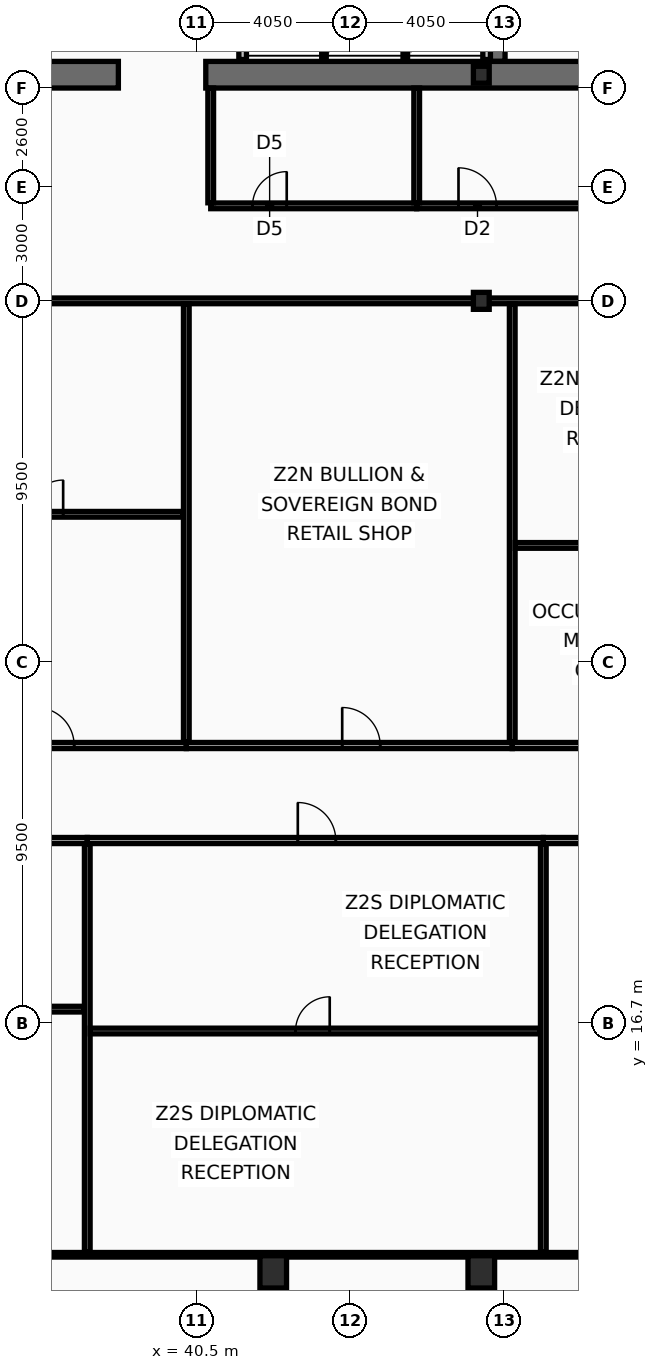
"""IFC4 building model, lengths in metres.
Left out: names, types, materials, properties, quantities, classifications, styles, units other than length and angle.
Written with IfcOpenShell. Run it as: python <this file> out.ifc"""

import sys

from ifc_helpers import new_model, si_unit, direction, frame, frame_2d, origin, origin_2d, place, context, subcontext, project, spatial, rectangle, hollow_rectangle, i_section, extrude, element, fill, save


model = new_model("IFC4")
c1 = context("Model", 3, precision=1e-05, world=origin(), true_north=direction((0.0, 1.0)))
c2 = subcontext(c1, "Body", "Model", "MODEL_VIEW")
j1 = project(units=[si_unit("LENGTHUNIT", "METRE"), si_unit("PLANEANGLEUNIT", "RADIAN")], contexts=[c1])
p1 = place(None, origin())
s1 = spatial("IfcSite", under=j1, at=p1, CompositionType="ELEMENT")
p2 = place(p1, origin())
s2 = spatial("IfcBuilding", under=s1, at=p2, CompositionType="ELEMENT")
p3 = place(p2, frame((0.0, 0.0, 165.0)))
s3 = spatial("IfcBuildingStorey", under=s2, at=p3, CompositionType="ELEMENT", Elevation=165.0)
p4 = place(p3, frame((48.4, 42.0, 0.0), z_axis=(0.0, 0.0, 1.0), x_axis=(0.0, 1.0, 0.0)))
e1 = element("IfcWall", 1, at=p4, inside=s3, PredefinedType="SHEAR", context=c2, shape_type="SweptSolid", body=[
    extrude(rectangle(XDim=11.0, YDim=0.45, at=frame_2d((5.5, 0.0))), origin(), (0.0, 0.0, 1.0), 3.44),
])
p5 = place(p3, frame((38.45, 41.65, 0.0), z_axis=(0.0, 0.0, 1.0), x_axis=(-1.0, 0.0, 0.0)))
e2 = element("IfcWall", 2, at=p5, inside=s3, PredefinedType="SHEAR", context=c2, shape_type="SweptSolid", body=[
    extrude(rectangle(XDim=3.75, YDim=0.7, at=frame_2d((1.875, 0.0))), origin(), (0.0, 0.0, 1.0), 3.44),
])
p6 = place(p3, frame((52.05, 41.65, 0.0), z_axis=(0.0, 0.0, 1.0), x_axis=(-1.0, 0.0, 0.0)))
e3 = element("IfcWall", 3, at=p6, inside=s3, PredefinedType="SHEAR", context=c2, shape_type="SweptSolid", body=[
    extrude(rectangle(XDim=11.3, YDim=0.7, at=frame_2d((5.65, 0.0))), origin(), (0.0, 0.0, 1.0), 3.44),
])
for number, where, z_axis, x_axis in (
    (4, (42.525, 10.15, 0.0), (0.0, 0.0, 1.0), (1.0, 0.0, 0.0)),
    (5, (48.0, 10.15, 0.0), (0.0, 0.0, 1.0), (1.0, 0.0, 0.0)),
):
    element("IfcColumn", number, at=place(p3, frame(where, z_axis=z_axis, x_axis=x_axis)), inside=s3, PredefinedType="COLUMN", context=c2, shape_type="SweptSolid", body=[
        extrude(hollow_rectangle(XDim=0.7, YDim=0.85, WallThickness=0.05, at=origin_2d()), origin(), (0.0, 0.0, 1.0), 3.6),
    ])
for number, where, z_axis, x_axis in (
    (6, (48.0, 35.7, 0.0), (0.0, 0.0, 1.0), (1.0, 0.0, 0.0)),
    (7, (48.0, 41.65, 0.0), (0.0, 0.0, 1.0), (1.0, 0.0, 0.0)),
):
    element("IfcColumn", number, at=place(p3, frame(where, z_axis=z_axis, x_axis=x_axis)), inside=s3, PredefinedType="COLUMN", context=c2, shape_type="SweptSolid", body=[
        extrude(i_section(OverallWidth=0.416, OverallDepth=0.446, WebThickness=0.039, FlangeThickness=0.063, at=origin_2d()), origin(), (0.0, 0.0, 1.0), 3.6),
    ])
for number, where, z_axis, x_axis in (
    (8, (41.72, 42.05, 0.0), (0.0, 0.0, 1.0), (0.0, 1.0, 0.0)),
    (9, (48.14, 42.05, 0.0), (0.0, 0.0, 1.0), (0.0, 1.0, 0.0)),
):
    element("IfcWall", number, at=place(p3, frame(where, z_axis=z_axis, x_axis=x_axis)), inside=s3, PredefinedType="PARTITIONING", context=c2, shape_type="SweptSolid", body=[
        extrude(rectangle(XDim=2.195, YDim=0.2, at=frame_2d((1.098, 0.0))), origin(), (0.0, 0.0, 1.0), 3.44),
    ])
for number, where, z_axis, x_axis in (
    (10, (43.86, 42.05, 0.0), (0.0, 0.0, 1.0), (0.0, 1.0, 0.0)),
    (11, (46.0, 42.05, 0.0), (0.0, 0.0, 1.0), (0.0, 1.0, 0.0)),
):
    element("IfcWall", number, at=place(p3, frame(where, z_axis=z_axis, x_axis=x_axis)), inside=s3, PredefinedType="PARTITIONING", context=c2, shape_type="SweptSolid", body=[
        extrude(rectangle(XDim=2.195, YDim=0.12, at=frame_2d((1.098, 0.0))), origin(), (0.0, 0.0, 1.0), 3.44),
    ])
p7 = place(p3, frame((40.88, 38.2, 0.0), z_axis=(0.0, 0.0, 1.0), x_axis=(1.0, 0.0, 0.0)))
e12 = element("IfcWall", 12, at=p7, inside=s3, PredefinedType="PARTITIONING", context=c2, shape_type="SweptSolid", body=[
    extrude(rectangle(XDim=5.42, YDim=0.15, at=frame_2d((2.71, 0.0))), origin(), (0.0, 0.0, 1.0), 2.73),
])
p8 = place(p7, frame((1.1, 0.0, 0.0)))
e13 = element("IfcOpeningElement", 13, at=p8, cuts=e12, PredefinedType="OPENING", context=c2, shape_type="SweptSolid", body=[
    extrude(rectangle(XDim=0.9, YDim=2.05, at=frame_2d((0.45, 1.025))), frame((0.0, 0.085, 0.0), z_axis=(0.0, -1.0, 0.0), x_axis=(1.0, 0.0, 0.0)), (0.0, 0.0, 1.0), 0.17),
])
p9 = place(p3, frame((46.3, 38.2, 0.0), z_axis=(0.0, 0.0, 1.0), x_axis=(1.0, 0.0, 0.0)))
e14 = element("IfcWall", 14, at=p9, inside=s3, PredefinedType="PARTITIONING", context=c2, shape_type="SweptSolid", body=[
    extrude(rectangle(XDim=5.65, YDim=0.15, at=frame_2d((2.825, 0.0))), origin(), (0.0, 0.0, 1.0), 2.73),
])
p10 = place(p9, frame((1.1, 0.0, 0.0)))
e15 = element("IfcOpeningElement", 15, at=p10, cuts=e14, PredefinedType="OPENING", context=c2, shape_type="SweptSolid", body=[
    extrude(rectangle(XDim=1.0, YDim=2.05, at=frame_2d((0.5, 1.025))), frame((0.0, 0.085, 0.0), z_axis=(0.0, -1.0, 0.0), x_axis=(1.0, 0.0, 0.0)), (0.0, 0.0, 1.0), 0.17),
])
for number, where, z_axis, x_axis in (
    (16, (40.88, 38.28, 0.0), (0.0, 0.0, 1.0), (0.0, 1.0, 0.0)),
    (17, (46.3, 38.28, 0.0), (0.0, 0.0, 1.0), (0.0, 1.0, 0.0)),
):
    element("IfcWall", number, at=place(p3, frame(where, z_axis=z_axis, x_axis=x_axis)), inside=s3, PredefinedType="PARTITIONING", context=c2, shape_type="SweptSolid", body=[
        extrude(rectangle(XDim=3.02, YDim=0.15, at=frame_2d((1.51, 0.0))), origin(), (0.0, 0.0, 1.0), 3.44),
    ])
p11 = place(p3, frame((24.093, 21.5, 0.0), z_axis=(0.0, 0.0, 1.0), x_axis=(1.0, 0.0, 0.0)))
e18 = element("IfcWall", 18, at=p11, inside=s3, PredefinedType="PARTITIONING", context=c2, shape_type="SweptSolid", body=[
    extrude(rectangle(XDim=13.538, YDim=0.16, at=frame_2d((6.769, 0.0))), origin(), (0.0, 0.0, 1.0), 2.73),
])
p12 = place(p11, frame((6.186, 0.0, 0.0)))
e19 = element("IfcOpeningElement", 19, at=p12, cuts=e18, PredefinedType="OPENING", context=c2, shape_type="SweptSolid", body=[
    extrude(rectangle(XDim=1.0, YDim=2.05, at=frame_2d((0.5, 1.025))), frame((0.0, 0.09, 0.0), z_axis=(0.0, -1.0, 0.0), x_axis=(1.0, 0.0, 0.0)), (0.0, 0.0, 1.0), 0.18),
])
p13 = place(p3, frame((24.173, 17.063, 0.0), z_axis=(0.0, 0.0, 1.0), x_axis=(1.0, 0.0, 0.0)))
e20 = element("IfcWall", 20, at=p13, inside=s3, PredefinedType="PARTITIONING", context=c2, shape_type="SweptSolid", body=[
    extrude(rectangle(XDim=13.378, YDim=0.15, at=frame_2d((6.689, 0.0))), origin(), (0.0, 0.0, 1.0), 2.73),
])
p14 = place(p13, frame((6.092, 0.0, 0.0)))
e21 = element("IfcOpeningElement", 21, at=p14, cuts=e20, PredefinedType="OPENING", context=c2, shape_type="SweptSolid", body=[
    extrude(rectangle(XDim=0.9, YDim=2.05, at=frame_2d((0.45, 1.025))), frame((0.0, 0.085, 0.0), z_axis=(0.0, -1.0, 0.0), x_axis=(1.0, 0.0, 0.0)), (0.0, 0.0, 1.0), 0.17),
])
p15 = place(p3, frame((37.631, 21.5, 0.0), z_axis=(0.0, 0.0, 1.0), x_axis=(1.0, 0.0, 0.0)))
e22 = element("IfcWall", 22, at=p15, inside=s3, PredefinedType="PARTITIONING", context=c2, shape_type="SweptSolid", body=[
    extrude(rectangle(XDim=12.0, YDim=0.16, at=frame_2d((6.0, 0.0))), origin(), (0.0, 0.0, 1.0), 2.73),
])
p16 = place(p15, frame((5.54, 0.0, 0.0)))
e23 = element("IfcOpeningElement", 23, at=p16, cuts=e22, PredefinedType="OPENING", context=c2, shape_type="SweptSolid", body=[
    extrude(rectangle(XDim=1.0, YDim=2.05, at=frame_2d((0.5, 1.025))), frame((0.0, 0.09, 0.0), z_axis=(0.0, -1.0, 0.0), x_axis=(1.0, 0.0, 0.0)), (0.0, 0.0, 1.0), 0.18),
])
p17 = place(p3, frame((37.631, 10.665, 0.0), z_axis=(0.0, 0.0, 1.0), x_axis=(0.0, 1.0, 0.0)))
e24 = element("IfcWall", 24, at=p17, inside=s3, PredefinedType="PARTITIONING", context=c2, shape_type="SweptSolid", body=[
    extrude(rectangle(XDim=10.75, YDim=0.15, at=frame_2d((5.375, 0.0))), origin(), (0.0, 0.0, 1.0), 2.93),
])
p18 = place(p3, frame((37.711, 16.488, 0.0), z_axis=(0.0, 0.0, 1.0), x_axis=(1.0, 0.0, 0.0)))
e25 = element("IfcWall", 25, at=p18, inside=s3, PredefinedType="PARTITIONING", context=c2, shape_type="SweptSolid", body=[
    extrude(rectangle(XDim=11.841, YDim=0.15, at=frame_2d((5.92, 0.0))), origin(), (0.0, 0.0, 1.0), 2.73),
])
p19 = place(p18, frame((5.4, 0.0, 0.0)))
e26 = element("IfcOpeningElement", 26, at=p19, cuts=e25, PredefinedType="OPENING", context=c2, shape_type="SweptSolid", body=[
    extrude(rectangle(XDim=0.9, YDim=2.05, at=frame_2d((0.45, 1.025))), frame((0.0, 0.085, 0.0), z_axis=(0.0, -1.0, 0.0), x_axis=(1.0, 0.0, 0.0)), (0.0, 0.0, 1.0), 0.17),
])
p20 = place(p3, frame((49.632, 21.5, 0.0), z_axis=(0.0, 0.0, 1.0), x_axis=(1.0, 0.0, 0.0)))
e27 = element("IfcWall", 27, at=p20, inside=s3, PredefinedType="PARTITIONING", context=c2, shape_type="SweptSolid", body=[
    extrude(rectangle(XDim=8.1, YDim=0.16, at=frame_2d((4.05, 0.0))), origin(), (0.0, 0.0, 1.0), 2.73),
])
p21 = place(p20, frame((3.902, 0.0, 0.0)))
e28 = element("IfcOpeningElement", 28, at=p21, cuts=e27, PredefinedType="OPENING", context=c2, shape_type="SweptSolid", body=[
    extrude(rectangle(XDim=1.0, YDim=2.05, at=frame_2d((0.5, 1.025))), frame((0.0, 0.09, 0.0), z_axis=(0.0, -1.0, 0.0), x_axis=(1.0, 0.0, 0.0)), (0.0, 0.0, 1.0), 0.18),
])
p22 = place(p3, frame((49.632, 10.665, 0.0), z_axis=(0.0, 0.0, 1.0), x_axis=(0.0, 1.0, 0.0)))
e29 = element("IfcWall", 29, at=p22, inside=s3, PredefinedType="PARTITIONING", context=c2, shape_type="SweptSolid", body=[
    extrude(rectangle(XDim=10.75, YDim=0.15, at=frame_2d((5.375, 0.0))), origin(), (0.0, 0.0, 1.0), 2.93),
])
p23 = place(p3, frame((21.81, 35.7, 0.0), z_axis=(0.0, 0.0, 1.0), x_axis=(1.0, 0.0, 0.0)))
e30 = element("IfcWall", 30, at=p23, inside=s3, PredefinedType="PARTITIONING", context=c2, shape_type="SweptSolid", body=[
    extrude(rectangle(XDim=44.995, YDim=0.15, at=frame_2d((22.498, 0.0))), origin(), (0.0, 0.0, 1.0), 2.73),
])
p24 = place(p3, frame((32.564, 24.0, 0.0), z_axis=(0.0, 0.0, 1.0), x_axis=(1.0, 0.0, 0.0)))
e31 = element("IfcWall", 31, at=p24, inside=s3, PredefinedType="PARTITIONING", context=c2, shape_type="SweptSolid", body=[
    extrude(rectangle(XDim=7.674, YDim=0.16, at=frame_2d((3.837, 0.0))), origin(), (0.0, 0.0, 1.0), 3.44),
])
p25 = place(p24, frame((3.723, 0.0, 0.0)))
e32 = element("IfcOpeningElement", 32, at=p25, cuts=e31, PredefinedType="OPENING", context=c2, shape_type="SweptSolid", body=[
    extrude(rectangle(XDim=1.0, YDim=2.05, at=frame_2d((0.5, 1.025))), frame((0.0, 0.09, 0.0), z_axis=(0.0, -1.0, 0.0), x_axis=(1.0, 0.0, 0.0)), (0.0, 0.0, 1.0), 0.18),
])
p26 = place(p3, frame((32.644, 30.084, 0.0), z_axis=(0.0, 0.0, 1.0), x_axis=(1.0, 0.0, 0.0)))
e33 = element("IfcWall", 33, at=p26, inside=s3, PredefinedType="PARTITIONING", context=c2, shape_type="SweptSolid", body=[
    extrude(rectangle(XDim=7.514, YDim=0.15, at=frame_2d((3.757, 0.0))), origin(), (0.0, 0.0, 1.0), 2.93),
])
p27 = place(p26, frame((3.453, 0.0, 0.0)))
e34 = element("IfcOpeningElement", 34, at=p27, cuts=e33, PredefinedType="OPENING", context=c2, shape_type="SweptSolid", body=[
    extrude(rectangle(XDim=0.9, YDim=2.05, at=frame_2d((0.45, 1.025))), frame((0.0, 0.085, 0.0), z_axis=(0.0, -1.0, 0.0), x_axis=(1.0, 0.0, 0.0)), (0.0, 0.0, 1.0), 0.17),
])
p28 = place(p3, frame((40.237, 24.0, 0.0), z_axis=(0.0, 0.0, 1.0), x_axis=(1.0, 0.0, 0.0)))
e35 = element("IfcWall", 35, at=p28, inside=s3, PredefinedType="PARTITIONING", context=c2, shape_type="SweptSolid", body=[
    extrude(rectangle(XDim=8.577, YDim=0.16, at=frame_2d((4.288, 0.0))), origin(), (0.0, 0.0, 1.0), 2.73),
])
p29 = place(p28, frame((4.102, 0.0, 0.0)))
e36 = element("IfcOpeningElement", 36, at=p29, cuts=e35, PredefinedType="OPENING", context=c2, shape_type="SweptSolid", body=[
    extrude(rectangle(XDim=1.0, YDim=2.05, at=frame_2d((0.5, 1.025))), frame((0.0, 0.09, 0.0), z_axis=(0.0, -1.0, 0.0), x_axis=(1.0, 0.0, 0.0)), (0.0, 0.0, 1.0), 0.18),
])
p30 = place(p3, frame((40.237, 24.085, 0.0), z_axis=(0.0, 0.0, 1.0), x_axis=(0.0, 1.0, 0.0)))
e37 = element("IfcWall", 37, at=p30, inside=s3, PredefinedType="PARTITIONING", context=c2, shape_type="SweptSolid", body=[
    extrude(rectangle(XDim=11.535, YDim=0.15, at=frame_2d((5.768, 0.0))), origin(), (0.0, 0.0, 1.0), 2.93),
])
p31 = place(p3, frame((48.814, 24.0, 0.0), z_axis=(0.0, 0.0, 1.0), x_axis=(1.0, 0.0, 0.0)))
e38 = element("IfcWall", 38, at=p31, inside=s3, PredefinedType="PARTITIONING", context=c2, shape_type="SweptSolid", body=[
    extrude(rectangle(XDim=9.479, YDim=0.16, at=frame_2d((4.74, 0.0))), origin(), (0.0, 0.0, 1.0), 2.73),
])
p32 = place(p31, frame((4.481, 0.0, 0.0)))
e39 = element("IfcOpeningElement", 39, at=p32, cuts=e38, PredefinedType="OPENING", context=c2, shape_type="SweptSolid", body=[
    extrude(rectangle(XDim=1.0, YDim=2.05, at=frame_2d((0.5, 1.025))), frame((0.0, 0.09, 0.0), z_axis=(0.0, -1.0, 0.0), x_axis=(1.0, 0.0, 0.0)), (0.0, 0.0, 1.0), 0.18),
])
p33 = place(p3, frame((48.814, 24.085, 0.0), z_axis=(0.0, 0.0, 1.0), x_axis=(0.0, 1.0, 0.0)))
e40 = element("IfcWall", 40, at=p33, inside=s3, PredefinedType="PARTITIONING", context=c2, shape_type="SweptSolid", body=[
    extrude(rectangle(XDim=11.535, YDim=0.15, at=frame_2d((5.768, 0.0))), origin(), (0.0, 0.0, 1.0), 2.93),
])
p34 = place(p3, frame((48.894, 29.265, 0.0), z_axis=(0.0, 0.0, 1.0), x_axis=(1.0, 0.0, 0.0)))
e41 = element("IfcWall", 41, at=p34, inside=s3, PredefinedType="PARTITIONING", context=c2, shape_type="SweptSolid", body=[
    extrude(rectangle(XDim=9.319, YDim=0.15, at=frame_2d((4.66, 0.0))), origin(), (0.0, 0.0, 1.0), 2.73),
])
p35 = place(p34, frame((4.266, 0.0, 0.0)))
e42 = element("IfcOpeningElement", 42, at=p35, cuts=e41, PredefinedType="OPENING", context=c2, shape_type="SweptSolid", body=[
    extrude(rectangle(XDim=0.9, YDim=2.05, at=frame_2d((0.45, 1.025))), frame((0.0, 0.085, 0.0), z_axis=(0.0, -1.0, 0.0), x_axis=(1.0, 0.0, 0.0)), (0.0, 0.0, 1.0), 0.17),
])
p36 = place(p3, frame((6.095, 10.6, 0.0), z_axis=(0.0, 0.0, 1.0), x_axis=(1.0, 0.0, 0.0)))
e43 = element("IfcWall", 43, at=p36, inside=s3, PredefinedType="PARTITIONING", context=c2, shape_type="SweptSolid", body=[
    extrude(rectangle(XDim=60.71, YDim=0.12, at=frame_2d((30.355, 0.0))), origin(), (0.0, 0.0, 1.0), 2.73),
])
p37 = place(p8, origin())
e44 = element("IfcDoor", 44, at=p37, inside=s3, OperationType="SINGLE_SWING_RIGHT", PredefinedType="DOOR", context=c2, shape_type="SweptSolid", body=[
    extrude(rectangle(XDim=0.9, YDim=2.05, at=frame_2d((0.45, 1.025))), frame((0.0, 0.025, 0.0), z_axis=(0.0, -1.0, 0.0), x_axis=(1.0, 0.0, 0.0)), (0.0, 0.0, 1.0), 0.05),
])
fill(e13, e44)
p38 = place(p10, origin())
e45 = element("IfcDoor", 45, at=p38, inside=s3, OperationType="SINGLE_SWING_LEFT", PredefinedType="DOOR", context=c2, shape_type="SweptSolid", body=[
    extrude(rectangle(XDim=1.0, YDim=2.05, at=frame_2d((0.5, 1.025))), frame((0.0, 0.025, 0.0), z_axis=(0.0, -1.0, 0.0), x_axis=(1.0, 0.0, 0.0)), (0.0, 0.0, 1.0), 0.05),
])
fill(e15, e45)
p39 = place(p16, origin())
e46 = element("IfcDoor", 46, at=p39, inside=s3, OperationType="SINGLE_SWING_LEFT", PredefinedType="DOOR", context=c2, shape_type="SweptSolid", body=[
    extrude(rectangle(XDim=1.0, YDim=2.05, at=frame_2d((0.5, 1.025))), frame((0.0, 0.025, 0.0), z_axis=(0.0, -1.0, 0.0), x_axis=(1.0, 0.0, 0.0)), (0.0, 0.0, 1.0), 0.05),
])
fill(e23, e46)
p40 = place(p19, origin())
e47 = element("IfcDoor", 47, at=p40, inside=s3, OperationType="SINGLE_SWING_RIGHT", PredefinedType="DOOR", context=c2, shape_type="SweptSolid", body=[
    extrude(rectangle(XDim=0.9, YDim=2.05, at=frame_2d((0.45, 1.025))), frame((0.0, 0.025, 0.0), z_axis=(0.0, -1.0, 0.0), x_axis=(1.0, 0.0, 0.0)), (0.0, 0.0, 1.0), 0.05),
])
fill(e26, e47)
p41 = place(p25, origin())
e48 = element("IfcDoor", 48, at=p41, inside=s3, OperationType="SINGLE_SWING_LEFT", PredefinedType="DOOR", context=c2, shape_type="SweptSolid", body=[
    extrude(rectangle(XDim=1.0, YDim=2.05, at=frame_2d((0.5, 1.025))), frame((0.0, 0.025, 0.0), z_axis=(0.0, -1.0, 0.0), x_axis=(1.0, 0.0, 0.0)), (0.0, 0.0, 1.0), 0.05),
])
fill(e32, e48)
p42 = place(p27, origin())
e49 = element("IfcDoor", 49, at=p42, inside=s3, OperationType="SINGLE_SWING_RIGHT", PredefinedType="DOOR", context=c2, shape_type="SweptSolid", body=[
    extrude(rectangle(XDim=0.9, YDim=2.05, at=frame_2d((0.45, 1.025))), frame((0.0, 0.025, 0.0), z_axis=(0.0, -1.0, 0.0), x_axis=(1.0, 0.0, 0.0)), (0.0, 0.0, 1.0), 0.05),
])
fill(e34, e49)
p43 = place(p29, origin())
e50 = element("IfcDoor", 50, at=p43, inside=s3, OperationType="SINGLE_SWING_LEFT", PredefinedType="DOOR", context=c2, shape_type="SweptSolid", body=[
    extrude(rectangle(XDim=1.0, YDim=2.05, at=frame_2d((0.5, 1.025))), frame((0.0, 0.025, 0.0), z_axis=(0.0, -1.0, 0.0), x_axis=(1.0, 0.0, 0.0)), (0.0, 0.0, 1.0), 0.05),
])
fill(e36, e50)
save(model, sys.argv[1])
